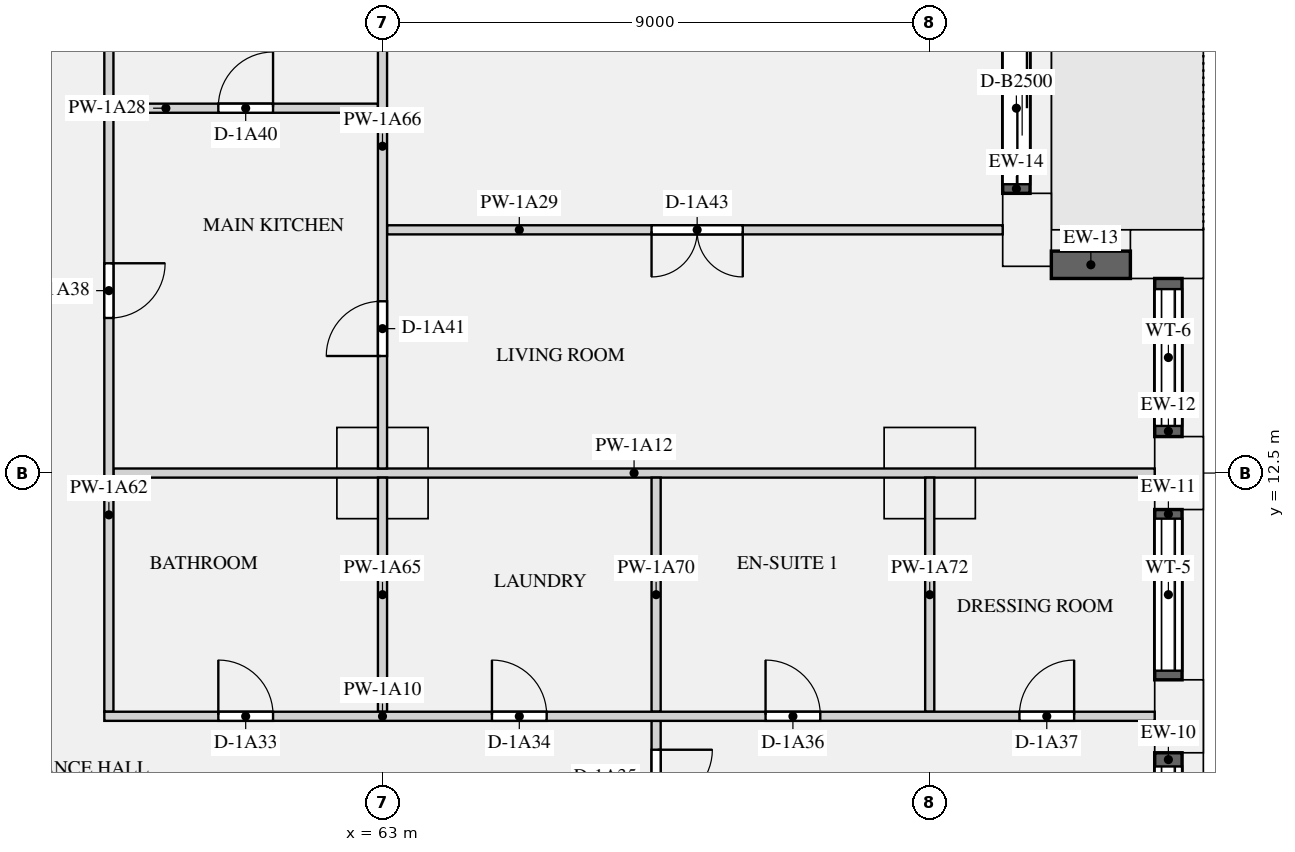
"""IFC4 building model, lengths in metres.
Left out: names, types, materials, properties, quantities, classifications, styles, units other than length and angle.
Written with IfcOpenShell. Run it as: python <this file> out.ifc"""

import sys

from ifc_helpers import new_model, si_unit, direction, frame, frame_2d, origin, origin_2d, place, context, subcontext, project, spatial, rectangle, extrude, element, fill, save


model = new_model("IFC4")
c1 = context("Model", 3, precision=1e-05, world=origin(), true_north=direction((0.0, 1.0)))
c2 = subcontext(c1, "Body", "Model", "MODEL_VIEW")
j1 = project(units=[si_unit("LENGTHUNIT", "METRE"), si_unit("PLANEANGLEUNIT", "RADIAN")], contexts=[c1])
p1 = place(None, origin())
s1 = spatial("IfcSite", under=j1, at=p1, CompositionType="ELEMENT")
p2 = place(p1, origin())
s2 = spatial("IfcBuilding", under=s1, at=p2, CompositionType="ELEMENT")
p3 = place(p2, frame((0.0, 0.0, 19.5)))
s3 = spatial("IfcBuildingStorey", under=s2, at=p3, CompositionType="ELEMENT", Elevation=19.5)
for number, where, z_axis, x_axis in (
    (1, (76.1, 8.5, -0.32), (0.0, 0.0, 1.0), (0.0, 1.0, 0.0)),
    (2, (76.1, 12.5, -0.32), (0.0, 0.0, 1.0), (0.0, 1.0, 0.0)),
):
    element("IfcColumn", number, at=place(p3, frame(where, z_axis=z_axis, x_axis=x_axis)), inside=s3, PredefinedType="USERDEFINED", context=c2, shape_type="SweptSolid", body=[
        extrude(rectangle(XDim=1.2, YDim=0.8, at=origin_2d()), origin(), (0.0, 0.0, 1.0), 3.47),
    ])
for number, where, z_axis, x_axis in (
    (3, (75.9, 16.1, 0.0), (0.0, 0.0, 1.0), (-1.0, 0.0, 0.0)),
    (4, (73.6, 16.5, 0.0), (0.0, 0.0, 1.0), (0.0, 1.0, 0.0)),
):
    element("IfcColumn", number, at=place(p3, frame(where, z_axis=z_axis, x_axis=x_axis)), inside=s3, PredefinedType="USERDEFINED", context=c2, shape_type="SweptSolid", body=[
        extrude(rectangle(XDim=1.2, YDim=0.8, at=origin_2d()), origin(), (0.0, 0.0, 1.0), 3.15),
    ])
for number, where, z_axis, x_axis in (
    (5, (63.0, 12.5, 0.0), (0.0, 0.0, 1.0), (1.0, 0.0, 0.0)),
    (6, (72.0, 12.5, 0.0), (0.0, 0.0, 1.0), (1.0, 0.0, 0.0)),
):
    element("IfcColumn", number, at=place(p3, frame(where, z_axis=z_axis, x_axis=x_axis)), inside=s3, PredefinedType="COLUMN", context=c2, shape_type="SweptSolid", body=[
        extrude(rectangle(XDim=1.5, YDim=1.5, at=origin_2d()), origin(), (0.0, 0.0, 1.0), 3.15),
    ])
p4 = place(p3, frame((75.925, 5.7, 0.9), z_axis=(0.0, 0.0, 1.0), x_axis=(0.0, 1.0, 0.0)))
e7 = element("IfcWall", 7, at=p4, inside=s3, PredefinedType="SOLIDWALL", context=c2, shape_type="SweptSolid", body=[
    extrude(rectangle(XDim=2.2, YDim=0.45, at=frame_2d((1.1, 0.0))), origin(), (0.0, 0.0, 1.0), 1.93),
])
p5 = place(p4, frame((0.225, 0.0, 0.15)))
e8 = element("IfcOpeningElement", 8, at=p5, cuts=e7, PredefinedType="OPENING", context=c2, shape_type="SweptSolid", body=[
    extrude(rectangle(XDim=1.75, YDim=1.5, at=frame_2d((0.875, 0.75))), frame((0.0, 0.235, 0.0), z_axis=(0.0, -1.0, 0.0), x_axis=(1.0, 0.0, 0.0)), (0.0, 0.0, 1.0), 0.47),
])
p6 = place(p3, frame((75.925, 9.1, 0.9), z_axis=(0.0, 0.0, 1.0), x_axis=(0.0, 1.0, 0.0)))
e9 = element("IfcWall", 9, at=p6, inside=s3, PredefinedType="SOLIDWALL", context=c2, shape_type="SweptSolid", body=[
    extrude(rectangle(XDim=2.8, YDim=0.45, at=frame_2d((1.4, 0.0))), origin(), (0.0, 0.0, 1.0), 1.93),
])
p7 = place(p6, frame((0.15, 0.0, 0.15)))
e10 = element("IfcOpeningElement", 10, at=p7, cuts=e9, PredefinedType="OPENING", context=c2, shape_type="SweptSolid", body=[
    extrude(rectangle(XDim=2.5, YDim=1.5, at=frame_2d((1.25, 0.75))), frame((0.0, 0.235, 0.0), z_axis=(0.0, -1.0, 0.0), x_axis=(1.0, 0.0, 0.0)), (0.0, 0.0, 1.0), 0.47),
])
p8 = place(p3, frame((75.925, 13.1, 0.9), z_axis=(0.0, 0.0, 1.0), x_axis=(0.0, 1.0, 0.0)))
e11 = element("IfcWall", 11, at=p8, inside=s3, PredefinedType="SOLIDWALL", context=c2, shape_type="SweptSolid", body=[
    extrude(rectangle(XDim=2.6, YDim=0.45, at=frame_2d((1.3, 0.0))), origin(), (0.0, 0.0, 1.0), 1.93),
])
p9 = place(p8, frame((0.175, 0.0, 0.15)))
e12 = element("IfcOpeningElement", 12, at=p9, cuts=e11, PredefinedType="OPENING", context=c2, shape_type="SweptSolid", body=[
    extrude(rectangle(XDim=2.25, YDim=1.5, at=frame_2d((1.125, 0.75))), frame((0.0, 0.235, 0.0), z_axis=(0.0, -1.0, 0.0), x_axis=(1.0, 0.0, 0.0)), (0.0, 0.0, 1.0), 0.47),
])
p10 = place(p3, frame((75.3, 15.925, 0.9), z_axis=(0.0, 0.0, 1.0), x_axis=(-1.0, 0.0, 0.0)))
e13 = element("IfcWall", 13, at=p10, inside=s3, PredefinedType="SOLIDWALL", context=c2, shape_type="SweptSolid", body=[
    extrude(rectangle(XDim=1.3, YDim=0.45, at=frame_2d((0.65, 0.0))), origin(), (0.0, 0.0, 1.0), 1.93),
])
p11 = place(p3, frame((73.425, 17.1, 0.0), z_axis=(0.0, 0.0, 1.0), x_axis=(0.0, 1.0, 0.0)))
e14 = element("IfcWall", 14, at=p11, inside=s3, PredefinedType="SOLIDWALL", context=c2, shape_type="SweptSolid", body=[
    extrude(rectangle(XDim=2.8, YDim=0.45, at=frame_2d((1.4, 0.0))), origin(), (0.0, 0.0, 1.0), 2.83),
])
p12 = place(p11, frame((0.15, 0.0, 0.0)))
e15 = element("IfcOpeningElement", 15, at=p12, cuts=e14, PredefinedType="OPENING", context=c2, shape_type="SweptSolid", body=[
    extrude(rectangle(XDim=2.5, YDim=2.3, at=frame_2d((1.25, 1.15))), frame((0.0, 0.235, 0.0), z_axis=(0.0, -1.0, 0.0), x_axis=(1.0, 0.0, 0.0)), (0.0, 0.0, 1.0), 0.47),
])
p13 = place(p3, frame((58.425, 8.5, 0.0), z_axis=(0.0, 0.0, 1.0), x_axis=(1.0, 0.0, 0.0)))
e16 = element("IfcWall", 16, at=p13, inside=s3, PredefinedType="PARTITIONING", context=c2, shape_type="SweptSolid", body=[
    extrude(rectangle(XDim=17.275, YDim=0.15, at=frame_2d((8.637, 0.0))), origin(), (0.0, 0.0, 1.0), 2.83),
])
p14 = place(p13, frame((1.875, 0.0, 0.0)))
e17 = element("IfcOpeningElement", 17, at=p14, cuts=e16, PredefinedType="OPENING", context=c2, shape_type="SweptSolid", body=[
    extrude(rectangle(XDim=0.9, YDim=2.1, at=frame_2d((0.45, 1.05))), frame((0.0, 0.085, 0.0), z_axis=(0.0, -1.0, 0.0), x_axis=(1.0, 0.0, 0.0)), (0.0, 0.0, 1.0), 0.17),
])
p15 = place(p13, frame((6.375, 0.0, 0.0)))
e18 = element("IfcOpeningElement", 18, at=p15, cuts=e16, PredefinedType="OPENING", context=c2, shape_type="SweptSolid", body=[
    extrude(rectangle(XDim=0.9, YDim=2.1, at=frame_2d((0.45, 1.05))), frame((0.0, 0.085, 0.0), z_axis=(0.0, -1.0, 0.0), x_axis=(1.0, 0.0, 0.0)), (0.0, 0.0, 1.0), 0.17),
])
p16 = place(p13, frame((10.875, 0.0, 0.0)))
e19 = element("IfcOpeningElement", 19, at=p16, cuts=e16, PredefinedType="OPENING", context=c2, shape_type="SweptSolid", body=[
    extrude(rectangle(XDim=0.9, YDim=2.1, at=frame_2d((0.45, 1.05))), frame((0.0, 0.085, 0.0), z_axis=(0.0, -1.0, 0.0), x_axis=(1.0, 0.0, 0.0)), (0.0, 0.0, 1.0), 0.17),
])
p17 = place(p13, frame((15.05, 0.0, 0.0)))
e20 = element("IfcOpeningElement", 20, at=p17, cuts=e16, PredefinedType="OPENING", context=c2, shape_type="SweptSolid", body=[
    extrude(rectangle(XDim=0.9, YDim=2.1, at=frame_2d((0.45, 1.05))), frame((0.0, 0.085, 0.0), z_axis=(0.0, -1.0, 0.0), x_axis=(1.0, 0.0, 0.0)), (0.0, 0.0, 1.0), 0.17),
])
p18 = place(p3, frame((58.575, 12.5, 0.0), z_axis=(0.0, 0.0, 1.0), x_axis=(1.0, 0.0, 0.0)))
e21 = element("IfcWall", 21, at=p18, inside=s3, PredefinedType="PARTITIONING", context=c2, shape_type="SweptSolid", body=[
    extrude(rectangle(XDim=17.125, YDim=0.15, at=frame_2d((8.562, 0.0))), origin(), (0.0, 0.0, 1.0), 2.83),
])
p19 = place(p3, frame((58.575, 18.5, 0.0), z_axis=(0.0, 0.0, 1.0), x_axis=(1.0, 0.0, 0.0)))
e22 = element("IfcWall", 22, at=p19, inside=s3, PredefinedType="PARTITIONING", context=c2, shape_type="SweptSolid", body=[
    extrude(rectangle(XDim=4.35, YDim=0.15, at=frame_2d((2.175, 0.0))), origin(), (0.0, 0.0, 1.0), 2.83),
])
p20 = place(p19, frame((1.725, 0.0, 0.0)))
e23 = element("IfcOpeningElement", 23, at=p20, cuts=e22, PredefinedType="OPENING", context=c2, shape_type="SweptSolid", body=[
    extrude(rectangle(XDim=0.9, YDim=2.1, at=frame_2d((0.45, 1.05))), frame((0.0, 0.085, 0.0), z_axis=(0.0, -1.0, 0.0), x_axis=(1.0, 0.0, 0.0)), (0.0, 0.0, 1.0), 0.17),
])
p21 = place(p3, frame((63.075, 16.5, 0.0), z_axis=(0.0, 0.0, 1.0), x_axis=(1.0, 0.0, 0.0)))
e24 = element("IfcWall", 24, at=p21, inside=s3, PredefinedType="PARTITIONING", context=c2, shape_type="SweptSolid", body=[
    extrude(rectangle(XDim=10.125, YDim=0.15, at=frame_2d((5.062, 0.0))), origin(), (0.0, 0.0, 1.0), 2.83),
])
p22 = place(p21, frame((4.35, 0.0, 0.0)))
e25 = element("IfcOpeningElement", 25, at=p22, cuts=e24, PredefinedType="OPENING", context=c2, shape_type="SweptSolid", body=[
    extrude(rectangle(XDim=1.5, YDim=2.1, at=frame_2d((0.75, 1.05))), frame((0.0, 0.085, 0.0), z_axis=(0.0, -1.0, 0.0), x_axis=(1.0, 0.0, 0.0)), (0.0, 0.0, 1.0), 0.17),
])
p23 = place(p3, frame((58.5, 8.575, 0.0), z_axis=(0.0, 0.0, 1.0), x_axis=(0.0, 1.0, 0.0)))
e26 = element("IfcWall", 26, at=p23, inside=s3, PredefinedType="PARTITIONING", context=c2, shape_type="SweptSolid", body=[
    extrude(rectangle(XDim=14.325, YDim=0.15, at=frame_2d((7.163, 0.0))), origin(), (0.0, 0.0, 1.0), 2.83),
])
p24 = place(p23, frame((6.475, 0.0, 0.0)))
e27 = element("IfcOpeningElement", 27, at=p24, cuts=e26, PredefinedType="OPENING", context=c2, shape_type="SweptSolid", body=[
    extrude(rectangle(XDim=0.9, YDim=2.1, at=frame_2d((0.45, 1.05))), frame((0.0, 0.085, 0.0), z_axis=(0.0, -1.0, 0.0), x_axis=(1.0, 0.0, 0.0)), (0.0, 0.0, 1.0), 0.17),
])
p25 = place(p23, frame((11.75, 0.0, 0.0)))
e28 = element("IfcOpeningElement", 28, at=p25, cuts=e26, PredefinedType="OPENING", context=c2, shape_type="SweptSolid", body=[
    extrude(rectangle(XDim=0.9, YDim=2.1, at=frame_2d((0.45, 1.05))), frame((0.0, 0.085, 0.0), z_axis=(0.0, -1.0, 0.0), x_axis=(1.0, 0.0, 0.0)), (0.0, 0.0, 1.0), 0.17),
])
p26 = place(p3, frame((63.0, 8.575, 0.0), z_axis=(0.0, 0.0, 1.0), x_axis=(0.0, 1.0, 0.0)))
e29 = element("IfcWall", 29, at=p26, inside=s3, PredefinedType="PARTITIONING", context=c2, shape_type="SweptSolid", body=[
    extrude(rectangle(XDim=3.85, YDim=0.15, at=frame_2d((1.925, 0.0))), origin(), (0.0, 0.0, 1.0), 2.83),
])
p27 = place(p3, frame((63.0, 12.575, 0.0), z_axis=(0.0, 0.0, 1.0), x_axis=(0.0, 1.0, 0.0)))
e30 = element("IfcWall", 30, at=p27, inside=s3, PredefinedType="PARTITIONING", context=c2, shape_type="SweptSolid", body=[
    extrude(rectangle(XDim=11.325, YDim=0.15, at=frame_2d((5.663, 0.0))), origin(), (0.0, 0.0, 1.0), 2.83),
])
p28 = place(p27, frame((1.85, 0.0, 0.0)))
e31 = element("IfcOpeningElement", 31, at=p28, cuts=e30, PredefinedType="OPENING", context=c2, shape_type="SweptSolid", body=[
    extrude(rectangle(XDim=0.9, YDim=2.1, at=frame_2d((0.45, 1.05))), frame((0.0, 0.085, 0.0), z_axis=(0.0, -1.0, 0.0), x_axis=(1.0, 0.0, 0.0)), (0.0, 0.0, 1.0), 0.17),
])
p29 = place(p27, frame((7.85, 0.0, 0.0)))
e32 = element("IfcOpeningElement", 32, at=p29, cuts=e30, PredefinedType="OPENING", context=c2, shape_type="SweptSolid", body=[
    extrude(rectangle(XDim=0.9, YDim=2.1, at=frame_2d((0.45, 1.05))), frame((0.0, 0.085, 0.0), z_axis=(0.0, -1.0, 0.0), x_axis=(1.0, 0.0, 0.0)), (0.0, 0.0, 1.0), 0.17),
])
p30 = place(p3, frame((67.5, 0.8, 0.0), z_axis=(0.0, 0.0, 1.0), x_axis=(0.0, 1.0, 0.0)))
e33 = element("IfcWall", 33, at=p30, inside=s3, PredefinedType="PARTITIONING", context=c2, shape_type="SweptSolid", body=[
    extrude(rectangle(XDim=7.625, YDim=0.15, at=frame_2d((3.812, 0.0))), origin(), (0.0, 0.0, 1.0), 2.83),
])
p31 = place(p30, frame((6.25, 0.0, 0.0)))
e34 = element("IfcOpeningElement", 34, at=p31, cuts=e33, PredefinedType="OPENING", context=c2, shape_type="SweptSolid", body=[
    extrude(rectangle(XDim=0.9, YDim=2.1, at=frame_2d((0.45, 1.05))), frame((0.0, 0.085, 0.0), z_axis=(0.0, -1.0, 0.0), x_axis=(1.0, 0.0, 0.0)), (0.0, 0.0, 1.0), 0.17),
])
for number, where, z_axis, x_axis in (
    (35, (67.5, 8.575, 0.0), (0.0, 0.0, 1.0), (0.0, 1.0, 0.0)),
    (36, (72.0, 8.575, 0.0), (0.0, 0.0, 1.0), (0.0, 1.0, 0.0)),
):
    element("IfcWall", number, at=place(p3, frame(where, z_axis=z_axis, x_axis=x_axis)), inside=s3, PredefinedType="PARTITIONING", context=c2, shape_type="SweptSolid", body=[
        extrude(rectangle(XDim=3.85, YDim=0.15, at=frame_2d((1.925, 0.0))), origin(), (0.0, 0.0, 1.0), 2.83),
    ])
p32 = place(p5, origin())
e37 = element("IfcWindow", 37, at=p32, inside=s3, PartitioningType="SINGLE_PANEL", PredefinedType="WINDOW", context=c2, shape_type="SweptSolid", body=[
    extrude(rectangle(XDim=1.75, YDim=1.5, at=frame_2d((0.875, 0.75))), frame((0.0, -0.065, 0.0), z_axis=(0.0, -1.0, 0.0), x_axis=(1.0, 0.0, 0.0)), (0.0, 0.0, 1.0), 0.06),
])
fill(e8, e37)
p33 = place(p7, origin())
e38 = element("IfcWindow", 38, at=p33, inside=s3, PartitioningType="SINGLE_PANEL", PredefinedType="WINDOW", context=c2, shape_type="SweptSolid", body=[
    extrude(rectangle(XDim=2.5, YDim=1.5, at=frame_2d((1.25, 0.75))), frame((0.0, -0.065, 0.0), z_axis=(0.0, -1.0, 0.0), x_axis=(1.0, 0.0, 0.0)), (0.0, 0.0, 1.0), 0.06),
])
fill(e10, e38)
p34 = place(p9, origin())
e39 = element("IfcWindow", 39, at=p34, inside=s3, PartitioningType="SINGLE_PANEL", PredefinedType="WINDOW", context=c2, shape_type="SweptSolid", body=[
    extrude(rectangle(XDim=2.25, YDim=1.5, at=frame_2d((1.125, 0.75))), frame((0.0, -0.065, 0.0), z_axis=(0.0, -1.0, 0.0), x_axis=(1.0, 0.0, 0.0)), (0.0, 0.0, 1.0), 0.06),
])
fill(e12, e39)
p35 = place(p12, origin())
e40 = element("IfcDoor", 40, at=p35, inside=s3, OperationType="SLIDING_TO_LEFT", PredefinedType="DOOR", context=c2, shape_type="SweptSolid", body=[
    extrude(rectangle(XDim=2.5, YDim=2.3, at=frame_2d((1.25, 1.15))), frame((0.0, -0.07, 0.0), z_axis=(0.0, -1.0, 0.0), x_axis=(1.0, 0.0, 0.0)), (0.0, 0.0, 1.0), 0.05),
])
fill(e15, e40)
p36 = place(p14, origin())
e41 = element("IfcDoor", 41, at=p36, inside=s3, OperationType="SINGLE_SWING_LEFT", PredefinedType="DOOR", context=c2, shape_type="SweptSolid", body=[
    extrude(rectangle(XDim=0.9, YDim=2.1, at=frame_2d((0.45, 1.05))), frame((0.0, 0.025, 0.0), z_axis=(0.0, -1.0, 0.0), x_axis=(1.0, 0.0, 0.0)), (0.0, 0.0, 1.0), 0.05),
])
fill(e17, e41)
p37 = place(p15, origin())
e42 = element("IfcDoor", 42, at=p37, inside=s3, OperationType="SINGLE_SWING_LEFT", PredefinedType="DOOR", context=c2, shape_type="SweptSolid", body=[
    extrude(rectangle(XDim=0.9, YDim=2.1, at=frame_2d((0.45, 1.05))), frame((0.0, 0.025, 0.0), z_axis=(0.0, -1.0, 0.0), x_axis=(1.0, 0.0, 0.0)), (0.0, 0.0, 1.0), 0.05),
])
fill(e18, e42)
p38 = place(p31, frame((0.9, 0.0, 0.0), z_axis=(0.0, 0.0, 1.0), x_axis=(-1.0, 0.0, 0.0)))
e43 = element("IfcDoor", 43, at=p38, inside=s3, OperationType="SINGLE_SWING_LEFT", PredefinedType="DOOR", context=c2, shape_type="SweptSolid", body=[
    extrude(rectangle(XDim=0.9, YDim=2.1, at=frame_2d((0.45, 1.05))), frame((0.0, 0.025, 0.0), z_axis=(0.0, -1.0, 0.0), x_axis=(1.0, 0.0, 0.0)), (0.0, 0.0, 1.0), 0.05),
])
fill(e34, e43)
p39 = place(p16, origin())
e44 = element("IfcDoor", 44, at=p39, inside=s3, OperationType="SINGLE_SWING_LEFT", PredefinedType="DOOR", context=c2, shape_type="SweptSolid", body=[
    extrude(rectangle(XDim=0.9, YDim=2.1, at=frame_2d((0.45, 1.05))), frame((0.0, 0.025, 0.0), z_axis=(0.0, -1.0, 0.0), x_axis=(1.0, 0.0, 0.0)), (0.0, 0.0, 1.0), 0.05),
])
fill(e19, e44)
p40 = place(p17, origin())
e45 = element("IfcDoor", 45, at=p40, inside=s3, OperationType="SINGLE_SWING_RIGHT", PredefinedType="DOOR", context=c2, shape_type="SweptSolid", body=[
    extrude(rectangle(XDim=0.9, YDim=2.1, at=frame_2d((0.45, 1.05))), frame((0.0, 0.025, 0.0), z_axis=(0.0, -1.0, 0.0), x_axis=(1.0, 0.0, 0.0)), (0.0, 0.0, 1.0), 0.05),
])
fill(e20, e45)
p41 = place(p24, frame((0.9, 0.0, 0.0), z_axis=(0.0, 0.0, 1.0), x_axis=(-1.0, 0.0, 0.0)))
e46 = element("IfcDoor", 46, at=p41, inside=s3, OperationType="SINGLE_SWING_LEFT", PredefinedType="DOOR", context=c2, shape_type="SweptSolid", body=[
    extrude(rectangle(XDim=0.9, YDim=2.1, at=frame_2d((0.45, 1.05))), frame((0.0, 0.025, 0.0), z_axis=(0.0, -1.0, 0.0), x_axis=(1.0, 0.0, 0.0)), (0.0, 0.0, 1.0), 0.05),
])
fill(e27, e46)
p42 = place(p20, origin())
e47 = element("IfcDoor", 47, at=p42, inside=s3, OperationType="SINGLE_SWING_RIGHT", PredefinedType="DOOR", context=c2, shape_type="SweptSolid", body=[
    extrude(rectangle(XDim=0.9, YDim=2.1, at=frame_2d((0.45, 1.05))), frame((0.0, 0.025, 0.0), z_axis=(0.0, -1.0, 0.0), x_axis=(1.0, 0.0, 0.0)), (0.0, 0.0, 1.0), 0.05),
])
fill(e23, e47)
p43 = place(p28, origin())
e48 = element("IfcDoor", 48, at=p43, inside=s3, OperationType="SINGLE_SWING_LEFT", PredefinedType="DOOR", context=c2, shape_type="SweptSolid", body=[
    extrude(rectangle(XDim=0.9, YDim=2.1, at=frame_2d((0.45, 1.05))), frame((0.0, 0.025, 0.0), z_axis=(0.0, -1.0, 0.0), x_axis=(1.0, 0.0, 0.0)), (0.0, 0.0, 1.0), 0.05),
])
fill(e31, e48)
p44 = place(p22, frame((1.5, 0.0, 0.0), z_axis=(0.0, 0.0, 1.0), x_axis=(-1.0, 0.0, 0.0)))
e49 = element("IfcDoor", 49, at=p44, inside=s3, OperationType="DOUBLE_DOOR_SINGLE_SWING", PredefinedType="DOOR", context=c2, shape_type="SweptSolid", body=[
    extrude(rectangle(XDim=1.5, YDim=2.1, at=frame_2d((0.75, 1.05))), frame((0.0, 0.025, 0.0), z_axis=(0.0, -1.0, 0.0), x_axis=(1.0, 0.0, 0.0)), (0.0, 0.0, 1.0), 0.05),
])
fill(e25, e49)
save(model, sys.argv[1])
